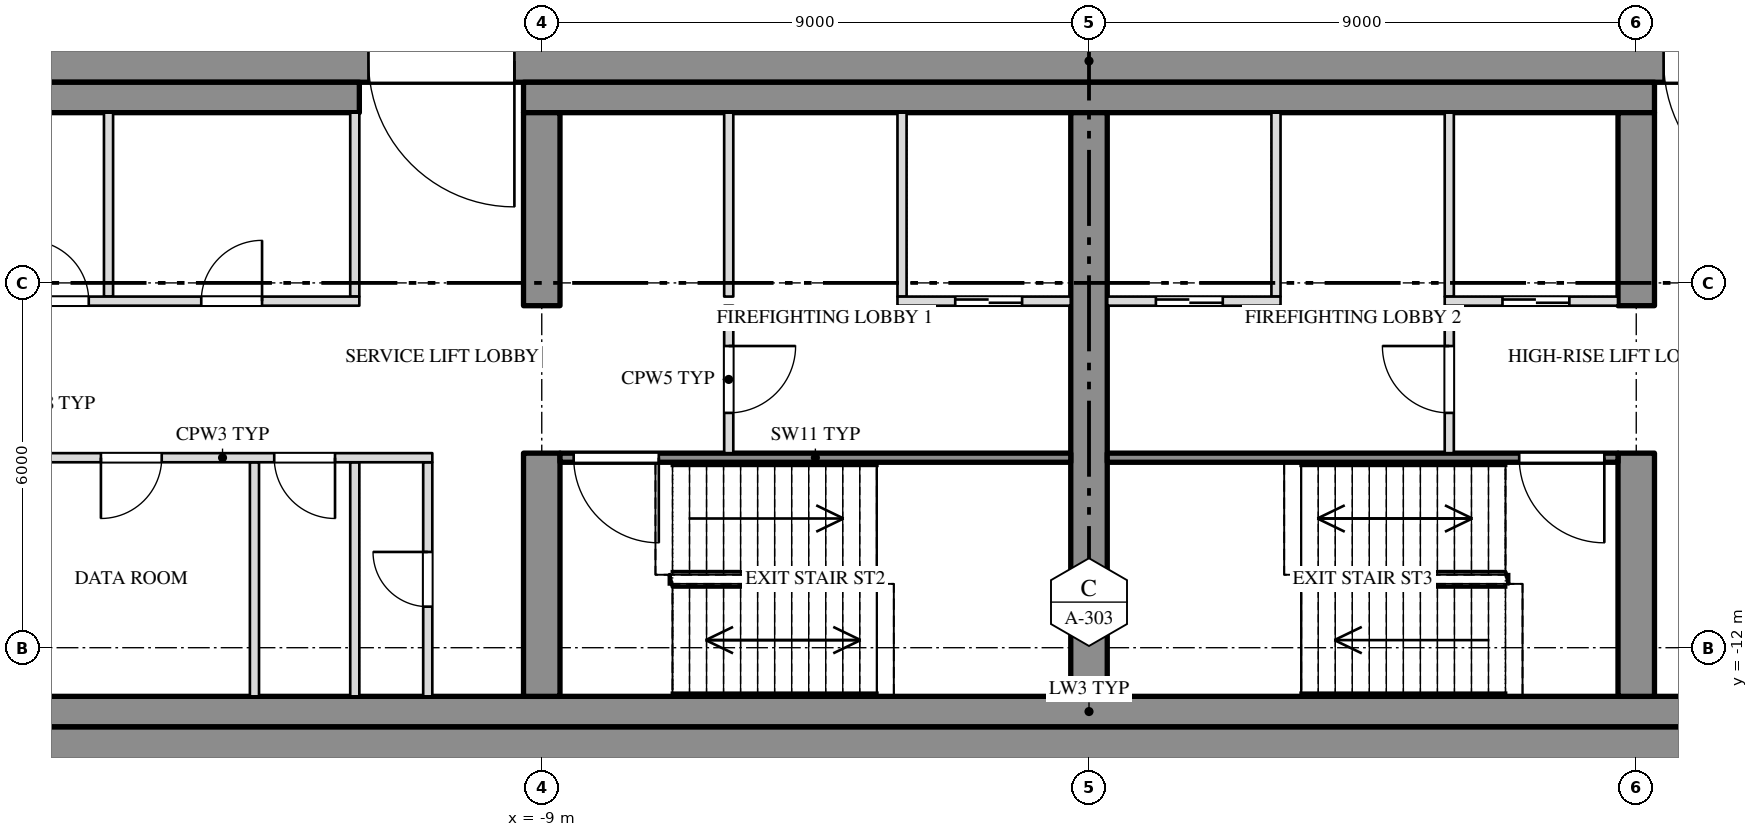
"""IFC4 building model, lengths in metres.
Left out: names, types, materials, properties, quantities, classifications, styles, units other than length and angle.
Written with IfcOpenShell. Run it as: python <this file> out.ifc"""

import sys

from ifc_helpers import new_model, si_unit, direction, frame, frame_2d, origin, place, context, subcontext, project, spatial, rectangle, extrude, element, fill, save


model = new_model("IFC4")
c1 = context("Model", 3, precision=1e-05, world=origin(), true_north=direction((0.0, 1.0)))
c2 = subcontext(c1, "Body", "Model", "MODEL_VIEW")
j1 = project(units=[si_unit("LENGTHUNIT", "METRE"), si_unit("PLANEANGLEUNIT", "RADIAN")], contexts=[c1])
p1 = place(None, origin())
s1 = spatial("IfcSite", under=j1, at=p1, CompositionType="ELEMENT")
p2 = place(p1, origin())
s2 = spatial("IfcBuilding", under=s1, at=p2, CompositionType="ELEMENT")
p3 = place(p2, frame((0.0, 0.0, 260.5)))
s3 = spatial("IfcBuildingStorey", under=s2, at=p3, CompositionType="ELEMENT", Elevation=260.5)
p4 = place(p3, frame((-27.0, -2.35, 0.0), z_axis=(0.0, 0.0, 1.0), x_axis=(1.0, 0.0, 0.0)))
e1 = element("IfcWall", 1, at=p4, inside=s3, PredefinedType="SHEAR", context=c2, shape_type="SweptSolid", body=[
    extrude(rectangle(XDim=54.0, YDim=0.7, at=frame_2d((27.0, 0.0))), origin(), (0.0, 0.0, 1.0), 3.7),
])
p5 = place(p4, frame((15.15, 0.0, 0.0)))
e2 = element("IfcOpeningElement", 2, at=p5, cuts=e1, PredefinedType="OPENING", context=c2, shape_type="SweptSolid", body=[
    extrude(rectangle(XDim=2.4, YDim=2.1, at=frame_2d((1.2, 1.05))), frame((0.0, 0.362, 0.0), z_axis=(0.0, -1.0, 0.0), x_axis=(1.0, 0.0, 0.0)), (0.0, 0.0, 1.0), 0.724),
])
p6 = place(p4, frame((36.45, 0.0, 0.0)))
e3 = element("IfcOpeningElement", 3, at=p6, cuts=e1, PredefinedType="OPENING", context=c2, shape_type="SweptSolid", body=[
    extrude(rectangle(XDim=2.4, YDim=2.1, at=frame_2d((1.2, 1.05))), frame((0.0, 0.362, 0.0), z_axis=(0.0, -1.0, 0.0), x_axis=(1.0, 0.0, 0.0)), (0.0, 0.0, 1.0), 0.724),
])
p7 = place(p3, frame((-27.0, -13.65, 0.0), z_axis=(0.0, 0.0, 1.0), x_axis=(1.0, 0.0, 0.0)))
e4 = element("IfcWall", 4, at=p7, inside=s3, PredefinedType="SHEAR", context=c2, shape_type="SweptSolid", body=[
    extrude(rectangle(XDim=54.0, YDim=0.7, at=frame_2d((27.0, 0.0))), origin(), (0.0, 0.0, 1.0), 3.7),
])
p8 = place(p3, frame((-26.3, -2.95, 0.0), z_axis=(0.0, 0.0, 1.0), x_axis=(1.0, 0.0, 0.0)))
e5 = element("IfcWall", 5, at=p8, inside=s3, PredefinedType="SHEAR", context=c2, shape_type="SweptSolid", body=[
    extrude(rectangle(XDim=14.3, YDim=0.5, at=frame_2d((7.15, 0.0))), origin(), (0.0, 0.0, 1.0), 3.7),
])
p9 = place(p3, frame((-9.3, -2.95, 0.0), z_axis=(0.0, 0.0, 1.0), x_axis=(1.0, 0.0, 0.0)))
e6 = element("IfcWall", 6, at=p9, inside=s3, PredefinedType="SHEAR", context=c2, shape_type="SweptSolid", body=[
    extrude(rectangle(XDim=18.6, YDim=0.5, at=frame_2d((9.3, 0.0))), origin(), (0.0, 0.0, 1.0), 3.7),
])
p10 = place(p3, frame((-26.3, -13.05, 0.0), z_axis=(0.0, 0.0, 1.0), x_axis=(1.0, 0.0, 0.0)))
e7 = element("IfcWall", 7, at=p10, inside=s3, PredefinedType="SHEAR", context=c2, shape_type="SweptSolid", body=[
    extrude(rectangle(XDim=52.6, YDim=0.5, at=frame_2d((26.3, 0.0))), origin(), (0.0, 0.0, 1.0), 3.7),
])
p11 = place(p3, frame((-9.0, -12.8, 0.0), z_axis=(0.0, 0.0, 1.0), x_axis=(0.0, 1.0, 0.0)))
e8 = element("IfcWall", 8, at=p11, inside=s3, PredefinedType="SHEAR", context=c2, shape_type="SweptSolid", body=[
    extrude(rectangle(XDim=4.0, YDim=0.6, at=frame_2d((2.0, 0.0))), origin(), (0.0, 0.0, 1.0), 3.7),
])
p12 = place(p3, frame((-9.0, -6.375, 0.0), z_axis=(0.0, 0.0, 1.0), x_axis=(0.0, 1.0, 0.0)))
e9 = element("IfcWall", 9, at=p12, inside=s3, PredefinedType="SHEAR", context=c2, shape_type="SweptSolid", body=[
    extrude(rectangle(XDim=3.175, YDim=0.6, at=frame_2d((1.587, 0.0))), origin(), (0.0, 0.0, 1.0), 3.7),
])
p13 = place(p3, frame((0.0, -12.8, 0.0), z_axis=(0.0, 0.0, 1.0), x_axis=(0.0, 1.0, 0.0)))
e10 = element("IfcWall", 10, at=p13, inside=s3, PredefinedType="SHEAR", context=c2, shape_type="SweptSolid", body=[
    extrude(rectangle(XDim=9.6, YDim=0.6, at=frame_2d((4.8, 0.0))), origin(), (0.0, 0.0, 1.0), 3.7),
])
p14 = place(p3, frame((9.0, -12.8, 0.0), z_axis=(0.0, 0.0, 1.0), x_axis=(0.0, 1.0, 0.0)))
e11 = element("IfcWall", 11, at=p14, inside=s3, PredefinedType="SHEAR", context=c2, shape_type="SweptSolid", body=[
    extrude(rectangle(XDim=4.0, YDim=0.6, at=frame_2d((2.0, 0.0))), origin(), (0.0, 0.0, 1.0), 3.7),
])
p15 = place(p3, frame((9.0, -6.375, 0.0), z_axis=(0.0, 0.0, 1.0), x_axis=(0.0, 1.0, 0.0)))
e12 = element("IfcWall", 12, at=p15, inside=s3, PredefinedType="SHEAR", context=c2, shape_type="SweptSolid", body=[
    extrude(rectangle(XDim=3.175, YDim=0.6, at=frame_2d((1.587, 0.0))), origin(), (0.0, 0.0, 1.0), 3.7),
])
for number, where, z_axis, x_axis in (
    (13, (-12.075, -6.225, 0.0), (0.0, 0.0, 1.0), (0.0, 1.0, 0.0)),
    (14, (-16.125, -6.225, 0.0), (0.0, 0.0, 1.0), (0.0, 1.0, 0.0)),
    (15, (-3.075, -6.225, 0.0), (0.0, 0.0, 1.0), (0.0, 1.0, 0.0)),
    (16, (-5.925, -6.225, 0.0), (0.0, 0.0, 1.0), (0.0, 1.0, 0.0)),
    (17, (3.075, -6.225, 0.0), (0.0, 0.0, 1.0), (0.0, 1.0, 0.0)),
    (18, (5.925, -6.225, 0.0), (0.0, 0.0, 1.0), (0.0, 1.0, 0.0)),
):
    element("IfcWall", number, at=place(p3, frame(where, z_axis=z_axis, x_axis=x_axis)), inside=s3, PredefinedType="PARTITIONING", context=c2, shape_type="SweptSolid", body=[
        extrude(rectangle(XDim=3.025, YDim=0.15, at=frame_2d((1.513, 0.0))), origin(), (0.0, 0.0, 1.0), 3.7),
    ])
p16 = place(p3, frame((-10.875, -12.8, 0.0), z_axis=(0.0, 0.0, 1.0), x_axis=(0.0, 1.0, 0.0)))
e19 = element("IfcWall", 19, at=p16, inside=s3, PredefinedType="PARTITIONING", context=c2, shape_type="SweptSolid", body=[
    extrude(rectangle(XDim=3.85, YDim=0.15, at=frame_2d((1.925, 0.0))), origin(), (0.0, 0.0, 1.0), 3.7),
])
p17 = place(p16, frame((1.475, 0.0, 0.0)))
e20 = element("IfcOpeningElement", 20, at=p17, cuts=e19, PredefinedType="OPENING", context=c2, shape_type="SweptSolid", body=[
    extrude(rectangle(XDim=0.9, YDim=2.1, at=frame_2d((0.45, 1.05))), frame((0.0, 0.087, 0.0), z_axis=(0.0, -1.0, 0.0), x_axis=(1.0, 0.0, 0.0)), (0.0, 0.0, 1.0), 0.174),
])
for number, where, z_axis, x_axis in (
    (21, (-12.075, -12.8, 0.0), (0.0, 0.0, 1.0), (0.0, 1.0, 0.0)),
    (22, (-13.725, -12.8, 0.0), (0.0, 0.0, 1.0), (0.0, 1.0, 0.0)),
):
    element("IfcWall", number, at=place(p3, frame(where, z_axis=z_axis, x_axis=x_axis)), inside=s3, PredefinedType="PARTITIONING", context=c2, shape_type="SweptSolid", body=[
        extrude(rectangle(XDim=3.85, YDim=0.15, at=frame_2d((1.925, 0.0))), origin(), (0.0, 0.0, 1.0), 3.7),
    ])
p18 = place(p3, frame((-5.925, -8.8, 0.0), z_axis=(0.0, 0.0, 1.0), x_axis=(0.0, 1.0, 0.0)))
e23 = element("IfcWall", 23, at=p18, inside=s3, PredefinedType="PARTITIONING", context=c2, shape_type="SweptSolid", body=[
    extrude(rectangle(XDim=2.425, YDim=0.15, at=frame_2d((1.212, 0.0))), origin(), (0.0, 0.0, 1.0), 3.7),
])
p19 = place(p18, frame((0.662, 0.0, 0.0)))
e24 = element("IfcOpeningElement", 24, at=p19, cuts=e23, PredefinedType="OPENING", context=c2, shape_type="SweptSolid", body=[
    extrude(rectangle(XDim=1.1, YDim=2.1, at=frame_2d((0.55, 1.05))), frame((0.0, 0.087, 0.0), z_axis=(0.0, -1.0, 0.0), x_axis=(1.0, 0.0, 0.0)), (0.0, 0.0, 1.0), 0.174),
])
p20 = place(p3, frame((5.925, -8.8, 0.0), z_axis=(0.0, 0.0, 1.0), x_axis=(0.0, 1.0, 0.0)))
e25 = element("IfcWall", 25, at=p20, inside=s3, PredefinedType="PARTITIONING", context=c2, shape_type="SweptSolid", body=[
    extrude(rectangle(XDim=2.425, YDim=0.15, at=frame_2d((1.212, 0.0))), origin(), (0.0, 0.0, 1.0), 3.7),
])
p21 = place(p20, frame((0.662, 0.0, 0.0)))
e26 = element("IfcOpeningElement", 26, at=p21, cuts=e25, PredefinedType="OPENING", context=c2, shape_type="SweptSolid", body=[
    extrude(rectangle(XDim=1.1, YDim=2.1, at=frame_2d((0.55, 1.05))), frame((0.0, 0.087, 0.0), z_axis=(0.0, -1.0, 0.0), x_axis=(1.0, 0.0, 0.0)), (0.0, 0.0, 1.0), 0.174),
])
p22 = place(p3, frame((-17.7, -6.3, 0.0), z_axis=(0.0, 0.0, 1.0), x_axis=(1.0, 0.0, 0.0)))
e27 = element("IfcWall", 27, at=p22, inside=s3, PredefinedType="PARTITIONING", context=c2, shape_type="SweptSolid", body=[
    extrude(rectangle(XDim=5.7, YDim=0.15, at=frame_2d((2.85, 0.0))), origin(), (0.0, 0.0, 1.0), 3.7),
])
p23 = place(p22, frame((0.25, 0.0, 0.0)))
e28 = element("IfcOpeningElement", 28, at=p23, cuts=e27, PredefinedType="OPENING", context=c2, shape_type="SweptSolid", body=[
    extrude(rectangle(XDim=1.0, YDim=2.1, at=frame_2d((0.5, 1.05))), frame((0.0, 0.087, 0.0), z_axis=(0.0, -1.0, 0.0), x_axis=(1.0, 0.0, 0.0)), (0.0, 0.0, 1.0), 0.174),
])
p24 = place(p22, frame((3.1, 0.0, 0.0)))
e29 = element("IfcOpeningElement", 29, at=p24, cuts=e27, PredefinedType="OPENING", context=c2, shape_type="SweptSolid", body=[
    extrude(rectangle(XDim=1.0, YDim=2.1, at=frame_2d((0.5, 1.05))), frame((0.0, 0.087, 0.0), z_axis=(0.0, -1.0, 0.0), x_axis=(1.0, 0.0, 0.0)), (0.0, 0.0, 1.0), 0.174),
])
p25 = place(p3, frame((-3.15, -6.3, 0.0), z_axis=(0.0, 0.0, 1.0), x_axis=(1.0, 0.0, 0.0)))
e30 = element("IfcWall", 30, at=p25, inside=s3, PredefinedType="PARTITIONING", context=c2, shape_type="SweptSolid", body=[
    extrude(rectangle(XDim=2.85, YDim=0.15, at=frame_2d((1.425, 0.0))), origin(), (0.0, 0.0, 1.0), 3.7),
])
p26 = place(p25, frame((0.95, 0.0, 0.0)))
e31 = element("IfcOpeningElement", 31, at=p26, cuts=e30, PredefinedType="OPENING", context=c2, shape_type="SweptSolid", body=[
    extrude(rectangle(XDim=1.1, YDim=2.1, at=frame_2d((0.55, 1.05))), frame((0.0, 0.087, 0.0), z_axis=(0.0, -1.0, 0.0), x_axis=(1.0, 0.0, 0.0)), (0.0, 0.0, 1.0), 0.174),
])
p27 = place(p3, frame((0.3, -6.3, 0.0), z_axis=(0.0, 0.0, 1.0), x_axis=(1.0, 0.0, 0.0)))
e32 = element("IfcWall", 32, at=p27, inside=s3, PredefinedType="PARTITIONING", context=c2, shape_type="SweptSolid", body=[
    extrude(rectangle(XDim=2.85, YDim=0.15, at=frame_2d((1.425, 0.0))), origin(), (0.0, 0.0, 1.0), 3.7),
])
p28 = place(p27, frame((0.8, 0.0, 0.0)))
e33 = element("IfcOpeningElement", 33, at=p28, cuts=e32, PredefinedType="OPENING", context=c2, shape_type="SweptSolid", body=[
    extrude(rectangle(XDim=1.1, YDim=2.1, at=frame_2d((0.55, 1.05))), frame((0.0, 0.087, 0.0), z_axis=(0.0, -1.0, 0.0), x_axis=(1.0, 0.0, 0.0)), (0.0, 0.0, 1.0), 0.174),
])
p29 = place(p3, frame((5.85, -6.3, 0.0), z_axis=(0.0, 0.0, 1.0), x_axis=(1.0, 0.0, 0.0)))
e34 = element("IfcWall", 34, at=p29, inside=s3, PredefinedType="PARTITIONING", context=c2, shape_type="SweptSolid", body=[
    extrude(rectangle(XDim=2.85, YDim=0.15, at=frame_2d((1.425, 0.0))), origin(), (0.0, 0.0, 1.0), 3.7),
])
p30 = place(p29, frame((0.95, 0.0, 0.0)))
e35 = element("IfcOpeningElement", 35, at=p30, cuts=e34, PredefinedType="OPENING", context=c2, shape_type="SweptSolid", body=[
    extrude(rectangle(XDim=1.1, YDim=2.1, at=frame_2d((0.55, 1.05))), frame((0.0, 0.087, 0.0), z_axis=(0.0, -1.0, 0.0), x_axis=(1.0, 0.0, 0.0)), (0.0, 0.0, 1.0), 0.174),
])
p31 = place(p3, frame((-17.7, -8.875, 0.0), z_axis=(0.0, 0.0, 1.0), x_axis=(1.0, 0.0, 0.0)))
e36 = element("IfcWall", 36, at=p31, inside=s3, PredefinedType="PARTITIONING", context=c2, shape_type="SweptSolid", body=[
    extrude(rectangle(XDim=6.9, YDim=0.15, at=frame_2d((3.45, 0.0))), origin(), (0.0, 0.0, 1.0), 3.7),
])
p32 = place(p31, frame((1.45, 0.0, 0.0)))
e37 = element("IfcOpeningElement", 37, at=p32, cuts=e36, PredefinedType="OPENING", context=c2, shape_type="SweptSolid", body=[
    extrude(rectangle(XDim=1.0, YDim=2.1, at=frame_2d((0.5, 1.05))), frame((0.0, 0.087, 0.0), z_axis=(0.0, -1.0, 0.0), x_axis=(1.0, 0.0, 0.0)), (0.0, 0.0, 1.0), 0.174),
])
p33 = place(p31, frame((4.3, 0.0, 0.0)))
e38 = element("IfcOpeningElement", 38, at=p33, cuts=e36, PredefinedType="OPENING", context=c2, shape_type="SweptSolid", body=[
    extrude(rectangle(XDim=1.0, YDim=2.1, at=frame_2d((0.5, 1.05))), frame((0.0, 0.087, 0.0), z_axis=(0.0, -1.0, 0.0), x_axis=(1.0, 0.0, 0.0)), (0.0, 0.0, 1.0), 0.174),
])
p34 = place(p3, frame((-8.7, -8.875, 0.0), z_axis=(0.0, 0.0, 1.0), x_axis=(1.0, 0.0, 0.0)))
e39 = element("IfcWall", 39, at=p34, inside=s3, PredefinedType="SHEAR", context=c2, shape_type="SweptSolid", body=[
    extrude(rectangle(XDim=8.4, YDim=0.15, at=frame_2d((4.2, 0.0))), origin(), (0.0, 0.0, 1.0), 3.7),
])
p35 = place(p34, frame((0.225, 0.0, 0.0)))
e40 = element("IfcOpeningElement", 40, at=p35, cuts=e39, PredefinedType="OPENING", context=c2, shape_type="SweptSolid", body=[
    extrude(rectangle(XDim=1.4, YDim=2.1, at=frame_2d((0.7, 1.05))), frame((0.0, 0.087, 0.0), z_axis=(0.0, -1.0, 0.0), x_axis=(1.0, 0.0, 0.0)), (0.0, 0.0, 1.0), 0.174),
])
p36 = place(p3, frame((0.3, -8.875, 0.0), z_axis=(0.0, 0.0, 1.0), x_axis=(1.0, 0.0, 0.0)))
e41 = element("IfcWall", 41, at=p36, inside=s3, PredefinedType="SHEAR", context=c2, shape_type="SweptSolid", body=[
    extrude(rectangle(XDim=8.4, YDim=0.15, at=frame_2d((4.2, 0.0))), origin(), (0.0, 0.0, 1.0), 3.7),
])
p37 = place(p36, frame((6.775, 0.0, 0.0)))
e42 = element("IfcOpeningElement", 42, at=p37, cuts=e41, PredefinedType="OPENING", context=c2, shape_type="SweptSolid", body=[
    extrude(rectangle(XDim=1.4, YDim=2.1, at=frame_2d((0.7, 1.05))), frame((0.0, 0.087, 0.0), z_axis=(0.0, -1.0, 0.0), x_axis=(1.0, 0.0, 0.0)), (0.0, 0.0, 1.0), 0.174),
])
p38 = place(p23, origin())
e43 = element("IfcDoor", 43, at=p38, inside=s3, OperationType="SINGLE_SWING_LEFT", PredefinedType="DOOR", context=c2, shape_type="SweptSolid", body=[
    extrude(rectangle(XDim=1.0, YDim=2.1, at=frame_2d((0.5, 1.05))), frame((0.0, 0.025, 0.0), z_axis=(0.0, -1.0, 0.0), x_axis=(1.0, 0.0, 0.0)), (0.0, 0.0, 1.0), 0.05),
])
fill(e28, e43)
p39 = place(p32, origin())
e44 = element("IfcDoor", 44, at=p39, inside=s3, OperationType="SINGLE_SWING_RIGHT", PredefinedType="DOOR", context=c2, shape_type="SweptSolid", body=[
    extrude(rectangle(XDim=1.0, YDim=2.1, at=frame_2d((0.5, 1.05))), frame((0.0, 0.025, 0.0), z_axis=(0.0, -1.0, 0.0), x_axis=(1.0, 0.0, 0.0)), (0.0, 0.0, 1.0), 0.05),
])
fill(e37, e44)
p40 = place(p24, origin())
e45 = element("IfcDoor", 45, at=p40, inside=s3, OperationType="SINGLE_SWING_RIGHT", PredefinedType="DOOR", context=c2, shape_type="SweptSolid", body=[
    extrude(rectangle(XDim=1.0, YDim=2.1, at=frame_2d((0.5, 1.05))), frame((0.0, 0.025, 0.0), z_axis=(0.0, -1.0, 0.0), x_axis=(1.0, 0.0, 0.0)), (0.0, 0.0, 1.0), 0.05),
])
fill(e29, e45)
p41 = place(p33, origin())
e46 = element("IfcDoor", 46, at=p41, inside=s3, OperationType="SINGLE_SWING_LEFT", PredefinedType="DOOR", context=c2, shape_type="SweptSolid", body=[
    extrude(rectangle(XDim=1.0, YDim=2.1, at=frame_2d((0.5, 1.05))), frame((0.0, 0.025, 0.0), z_axis=(0.0, -1.0, 0.0), x_axis=(1.0, 0.0, 0.0)), (0.0, 0.0, 1.0), 0.05),
])
fill(e38, e46)
p42 = place(p17, origin())
e47 = element("IfcDoor", 47, at=p42, inside=s3, OperationType="SINGLE_SWING_RIGHT", PredefinedType="DOOR", context=c2, shape_type="SweptSolid", body=[
    extrude(rectangle(XDim=0.9, YDim=2.1, at=frame_2d((0.45, 1.05))), frame((0.0, 0.025, 0.0), z_axis=(0.0, -1.0, 0.0), x_axis=(1.0, 0.0, 0.0)), (0.0, 0.0, 1.0), 0.05),
])
fill(e20, e47)
p43 = place(p5, origin())
e48 = element("IfcDoor", 48, at=p43, inside=s3, OperationType="DOUBLE_DOOR_SINGLE_SWING", PredefinedType="DOOR", context=c2, shape_type="SweptSolid", body=[
    extrude(rectangle(XDim=2.4, YDim=2.1, at=frame_2d((1.2, 1.05))), frame((0.0, 0.025, 0.0), z_axis=(0.0, -1.0, 0.0), x_axis=(1.0, 0.0, 0.0)), (0.0, 0.0, 1.0), 0.05),
])
fill(e2, e48)
p44 = place(p35, origin())
e49 = element("IfcDoor", 49, at=p44, inside=s3, OperationType="DOUBLE_DOOR_SINGLE_SWING", PredefinedType="DOOR", context=c2, shape_type="SweptSolid", body=[
    extrude(rectangle(XDim=1.4, YDim=2.1, at=frame_2d((0.7, 1.05))), frame((0.0, 0.025, 0.0), z_axis=(0.0, -1.0, 0.0), x_axis=(1.0, 0.0, 0.0)), (0.0, 0.0, 1.0), 0.05),
])
fill(e40, e49)
p45 = place(p19, origin())
e50 = element("IfcDoor", 50, at=p45, inside=s3, OperationType="SINGLE_SWING_LEFT", PredefinedType="DOOR", context=c2, shape_type="SweptSolid", body=[
    extrude(rectangle(XDim=1.1, YDim=2.1, at=frame_2d((0.55, 1.05))), frame((0.0, 0.025, 0.0), z_axis=(0.0, -1.0, 0.0), x_axis=(1.0, 0.0, 0.0)), (0.0, 0.0, 1.0), 0.05),
])
fill(e24, e50)
p46 = place(p26, origin())
e51 = element("IfcDoor", 51, at=p46, inside=s3, OperationType="SLIDING_TO_LEFT", PredefinedType="DOOR", context=c2, shape_type="SweptSolid", body=[
    extrude(rectangle(XDim=1.1, YDim=2.1, at=frame_2d((0.55, 1.05))), frame((0.0, 0.025, 0.0), z_axis=(0.0, -1.0, 0.0), x_axis=(1.0, 0.0, 0.0)), (0.0, 0.0, 1.0), 0.05),
])
fill(e31, e51)
p47 = place(p28, origin())
e52 = element("IfcDoor", 52, at=p47, inside=s3, OperationType="SLIDING_TO_RIGHT", PredefinedType="DOOR", context=c2, shape_type="SweptSolid", body=[
    extrude(rectangle(XDim=1.1, YDim=2.1, at=frame_2d((0.55, 1.05))), frame((0.0, 0.025, 0.0), z_axis=(0.0, -1.0, 0.0), x_axis=(1.0, 0.0, 0.0)), (0.0, 0.0, 1.0), 0.05),
])
fill(e33, e52)
p48 = place(p21, origin())
e53 = element("IfcDoor", 53, at=p48, inside=s3, OperationType="SINGLE_SWING_RIGHT", PredefinedType="DOOR", context=c2, shape_type="SweptSolid", body=[
    extrude(rectangle(XDim=1.1, YDim=2.1, at=frame_2d((0.55, 1.05))), frame((0.0, 0.025, 0.0), z_axis=(0.0, -1.0, 0.0), x_axis=(1.0, 0.0, 0.0)), (0.0, 0.0, 1.0), 0.05),
])
fill(e26, e53)
p49 = place(p30, origin())
e54 = element("IfcDoor", 54, at=p49, inside=s3, OperationType="SLIDING_TO_RIGHT", PredefinedType="DOOR", context=c2, shape_type="SweptSolid", body=[
    extrude(rectangle(XDim=1.1, YDim=2.1, at=frame_2d((0.55, 1.05))), frame((0.0, 0.025, 0.0), z_axis=(0.0, -1.0, 0.0), x_axis=(1.0, 0.0, 0.0)), (0.0, 0.0, 1.0), 0.05),
])
fill(e35, e54)
p50 = place(p37, origin())
e55 = element("IfcDoor", 55, at=p50, inside=s3, OperationType="DOUBLE_DOOR_SINGLE_SWING", PredefinedType="DOOR", context=c2, shape_type="SweptSolid", body=[
    extrude(rectangle(XDim=1.4, YDim=2.1, at=frame_2d((0.7, 1.05))), frame((0.0, 0.025, 0.0), z_axis=(0.0, -1.0, 0.0), x_axis=(1.0, 0.0, 0.0)), (0.0, 0.0, 1.0), 0.05),
])
fill(e42, e55)
p51 = place(p6, origin())
e56 = element("IfcDoor", 56, at=p51, inside=s3, OperationType="DOUBLE_DOOR_SINGLE_SWING", PredefinedType="DOOR", context=c2, shape_type="SweptSolid", body=[
    extrude(rectangle(XDim=2.4, YDim=2.1, at=frame_2d((1.2, 1.05))), frame((0.0, 0.025, 0.0), z_axis=(0.0, -1.0, 0.0), x_axis=(1.0, 0.0, 0.0)), (0.0, 0.0, 1.0), 0.05),
])
fill(e3, e56)
save(model, sys.argv[1])
